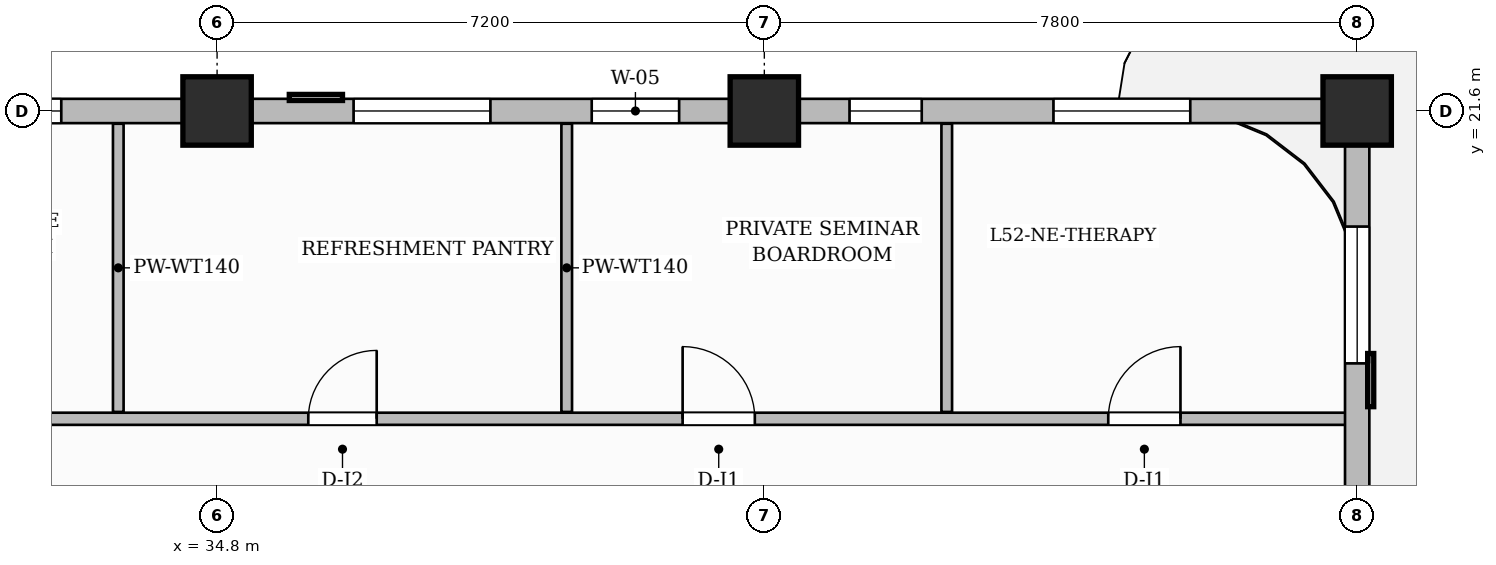
"""IFC4 building model, lengths in metres.
Left out: names, types, materials, properties, quantities, classifications, styles, units other than length and angle.
Written with IfcOpenShell. Run it as: python <this file> out.ifc"""

import sys

from ifc_helpers import new_model, si_unit, direction, frame, frame_2d, origin, origin_2d, place, context, subcontext, project, spatial, rectangle, extrude, source, transform, mapped, element, fill, save


model = new_model("IFC4")
c1 = context("Model", 3, precision=1e-05, world=origin(), true_north=direction((0.0, 1.0)))
c2 = subcontext(c1, "Body", "Model", "MODEL_VIEW")
j1 = project(units=[si_unit("LENGTHUNIT", "METRE"), si_unit("PLANEANGLEUNIT", "RADIAN")], contexts=[c1])
p1 = place(None, origin())
s1 = spatial("IfcSite", under=j1, at=p1, CompositionType="ELEMENT")
p2 = place(p1, origin())
s2 = spatial("IfcBuilding", under=s1, at=p2, CompositionType="ELEMENT")
p3 = place(p2, frame((0.0, 0.0, 209.6)))
s3 = spatial("IfcBuildingStorey", under=s2, at=p3, CompositionType="ELEMENT", Elevation=209.6)
m1 = source(origin(), c2, "Body", "SweptSolid", [
    extrude(rectangle(XDim=0.9, YDim=0.9, at=origin_2d()), origin(), (0.0, 0.0, 1.0), 3.85),
])
for number, where, z_axis, x_axis in (
    (1, (34.8, 21.6, 0.0), (0.0, 0.0, 1.0), (1.0, 0.0, 0.0)),
    (2, (42.0, 21.6, 0.0), (0.0, 0.0, 1.0), (1.0, 0.0, 0.0)),
    (3, (49.8, 21.6, 0.0), (0.0, 0.0, 1.0), (1.0, 0.0, 0.0)),
):
    element("IfcColumn", number, at=place(p3, frame(where, z_axis=z_axis, x_axis=x_axis)), inside=s3, PredefinedType="COLUMN", context=c2, shape_type="MappedRepresentation", body=[
        mapped(m1, transform((0.0, 0.0, 0.0), scale=1.0)),
    ])
p4 = place(p3, frame((30.29, 17.55, 0.0), z_axis=(0.0, 0.0, 1.0), x_axis=(1.0, 0.0, 0.0)))
e4 = element("IfcWall", 4, at=p4, inside=s3, PredefinedType="PARTITIONING", context=c2, shape_type="SweptSolid", body=[
    extrude(rectangle(XDim=19.37, YDim=0.16, at=frame_2d((9.685, 0.0))), origin(), (0.0, 0.0, 1.0), 3.6),
])
p5 = place(p4, frame((1.135, 0.0, 0.0)))
e5 = element("IfcOpeningElement", 5, at=p5, cuts=e4, PredefinedType="OPENING", context=c2, shape_type="SweptSolid", body=[
    extrude(rectangle(XDim=0.85, YDim=2.1, at=frame_2d((0.425, 1.05))), frame((0.0, 0.09, 0.0), z_axis=(0.0, -1.0, 0.0), x_axis=(1.0, 0.0, 0.0)), (0.0, 0.0, 1.0), 0.18),
])
p6 = place(p4, frame((5.71, 0.0, 0.0)))
e6 = element("IfcOpeningElement", 6, at=p6, cuts=e4, PredefinedType="OPENING", context=c2, shape_type="SweptSolid", body=[
    extrude(rectangle(XDim=0.9, YDim=2.15, at=frame_2d((0.45, 1.075))), frame((0.0, 0.09, 0.0), z_axis=(0.0, -1.0, 0.0), x_axis=(1.0, 0.0, 0.0)), (0.0, 0.0, 1.0), 0.18),
])
p7 = place(p4, frame((10.635, 0.0, 0.0)))
e7 = element("IfcOpeningElement", 7, at=p7, cuts=e4, PredefinedType="OPENING", context=c2, shape_type="SweptSolid", body=[
    extrude(rectangle(XDim=0.95, YDim=2.15, at=frame_2d((0.475, 1.075))), frame((0.0, 0.09, 0.0), z_axis=(0.0, -1.0, 0.0), x_axis=(1.0, 0.0, 0.0)), (0.0, 0.0, 1.0), 0.18),
])
p8 = place(p4, frame((16.235, 0.0, 0.0)))
e8 = element("IfcOpeningElement", 8, at=p8, cuts=e4, PredefinedType="OPENING", context=c2, shape_type="SweptSolid", body=[
    extrude(rectangle(XDim=0.95, YDim=2.15, at=frame_2d((0.475, 1.075))), frame((0.0, 0.09, 0.0), z_axis=(0.0, -1.0, 0.0), x_axis=(1.0, 0.0, 0.0)), (0.0, 0.0, 1.0), 0.18),
])
for number, where, z_axis, x_axis in (
    (9, (33.5, 17.64, 0.0), (0.0, 0.0, 1.0), (0.0, 1.0, 0.0)),
    (10, (39.4, 17.64, 0.0), (0.0, 0.0, 1.0), (0.0, 1.0, 0.0)),
    (11, (44.4, 17.64, 0.0), (0.0, 0.0, 1.0), (0.0, 1.0, 0.0)),
):
    element("IfcWall", number, at=place(p3, frame(where, z_axis=z_axis, x_axis=x_axis)), inside=s3, PredefinedType="PARTITIONING", context=c2, shape_type="SweptSolid", body=[
        extrude(rectangle(XDim=3.792, YDim=0.14, at=frame_2d((1.896, 0.0))), origin(), (0.0, 0.0, 1.0), 3.6),
    ])
p9 = place(p3, frame((49.8, 14.62, 0.0), z_axis=(0.0, 0.0, 1.0), x_axis=(0.0, 1.0, 0.0)))
e12 = element("IfcWall", 12, at=p9, inside=s3, PredefinedType="SOLIDWALL", context=c2, shape_type="SweptSolid", body=[
    extrude(rectangle(XDim=6.93, YDim=0.32, at=frame_2d((3.465, 0.0))), origin(), (0.0, 0.0, 1.0), 3.085),
])
p10 = place(p9, frame((0.42, 0.0, 0.0)))
e13 = element("IfcOpeningElement", 13, at=p10, cuts=e12, PredefinedType="OPENING", context=c2, shape_type="SweptSolid", body=[
    extrude(rectangle(XDim=1.2, YDim=2.2, at=frame_2d((0.6, 1.1))), frame((0.0, 0.17, 0.0), z_axis=(0.0, -1.0, 0.0), x_axis=(1.0, 0.0, 0.0)), (0.0, 0.0, 1.0), 0.34),
])
p11 = place(p9, frame((3.659, 0.0, 0.8)))
e14 = element("IfcOpeningElement", 14, at=p11, cuts=e12, PredefinedType="OPENING", context=c2, shape_type="SweptSolid", body=[
    extrude(rectangle(XDim=1.8, YDim=1.85, at=frame_2d((0.9, 0.925))), frame((0.0, 0.17, 0.0), z_axis=(0.0, -1.0, 0.0), x_axis=(1.0, 0.0, 0.0)), (0.0, 0.0, 1.0), 0.34),
])
p12 = place(p3, frame((18.0, 21.6, 0.0), z_axis=(0.0, 0.0, 1.0), x_axis=(1.0, 0.0, 0.0)))
e15 = element("IfcWall", 15, at=p12, inside=s3, PredefinedType="SOLIDWALL", context=c2, shape_type="SweptSolid", body=[
    extrude(rectangle(XDim=31.8, YDim=0.32, at=frame_2d((15.9, 0.0))), origin(), (0.0, 0.0, 1.0), 3.085),
])
p13 = place(p12, frame((0.885, 0.0, 0.8)))
e16 = element("IfcOpeningElement", 16, at=p13, cuts=e15, PredefinedType="OPENING", context=c2, shape_type="SweptSolid", body=[
    extrude(rectangle(XDim=1.4, YDim=1.85, at=frame_2d((0.7, 0.925))), frame((0.0, 0.17, 0.0), z_axis=(0.0, -1.0, 0.0), x_axis=(1.0, 0.0, 0.0)), (0.0, 0.0, 1.0), 0.34),
])
p14 = place(p12, frame((4.581, 0.0, 0.8)))
e17 = element("IfcOpeningElement", 17, at=p14, cuts=e15, PredefinedType="OPENING", context=c2, shape_type="SweptSolid", body=[
    extrude(rectangle(XDim=0.95, YDim=1.75, at=frame_2d((0.475, 0.875))), frame((0.0, 0.17, 0.0), z_axis=(0.0, -1.0, 0.0), x_axis=(1.0, 0.0, 0.0)), (0.0, 0.0, 1.0), 0.34),
])
p15 = place(p12, frame((6.21, 0.0, 0.8)))
e18 = element("IfcOpeningElement", 18, at=p15, cuts=e15, PredefinedType="OPENING", context=c2, shape_type="SweptSolid", body=[
    extrude(rectangle(XDim=1.4, YDim=1.85, at=frame_2d((0.7, 0.925))), frame((0.0, 0.17, 0.0), z_axis=(0.0, -1.0, 0.0), x_axis=(1.0, 0.0, 0.0)), (0.0, 0.0, 1.0), 0.34),
])
p16 = place(p12, frame((8.48, 0.0, 0.8)))
e19 = element("IfcOpeningElement", 19, at=p16, cuts=e15, PredefinedType="OPENING", context=c2, shape_type="SweptSolid", body=[
    extrude(rectangle(XDim=1.15, YDim=1.8, at=frame_2d((0.575, 0.9))), frame((0.0, 0.17, 0.0), z_axis=(0.0, -1.0, 0.0), x_axis=(1.0, 0.0, 0.0)), (0.0, 0.0, 1.0), 0.34),
])
p17 = place(p12, frame((12.95, 0.0, 0.8)))
e20 = element("IfcOpeningElement", 20, at=p17, cuts=e15, PredefinedType="OPENING", context=c2, shape_type="SweptSolid", body=[
    extrude(rectangle(XDim=1.8, YDim=1.85, at=frame_2d((0.9, 0.925))), frame((0.0, 0.17, 0.0), z_axis=(0.0, -1.0, 0.0), x_axis=(1.0, 0.0, 0.0)), (0.0, 0.0, 1.0), 0.34),
])
p18 = place(p12, frame((18.596, 0.0, 0.8)))
e21 = element("IfcOpeningElement", 21, at=p18, cuts=e15, PredefinedType="OPENING", context=c2, shape_type="SweptSolid", body=[
    extrude(rectangle(XDim=1.8, YDim=1.85, at=frame_2d((0.9, 0.925))), frame((0.0, 0.17, 0.0), z_axis=(0.0, -1.0, 0.0), x_axis=(1.0, 0.0, 0.0)), (0.0, 0.0, 1.0), 0.34),
])
p19 = place(p12, frame((21.729, 0.0, 0.8)))
e22 = element("IfcOpeningElement", 22, at=p19, cuts=e15, PredefinedType="OPENING", context=c2, shape_type="SweptSolid", body=[
    extrude(rectangle(XDim=1.15, YDim=1.8, at=frame_2d((0.575, 0.9))), frame((0.0, 0.17, 0.0), z_axis=(0.0, -1.0, 0.0), x_axis=(1.0, 0.0, 0.0)), (0.0, 0.0, 1.0), 0.34),
])
p20 = place(p12, frame((25.121, 0.0, 0.8)))
e23 = element("IfcOpeningElement", 23, at=p20, cuts=e15, PredefinedType="OPENING", context=c2, shape_type="SweptSolid", body=[
    extrude(rectangle(XDim=0.95, YDim=1.75, at=frame_2d((0.475, 0.875))), frame((0.0, 0.17, 0.0), z_axis=(0.0, -1.0, 0.0), x_axis=(1.0, 0.0, 0.0)), (0.0, 0.0, 1.0), 0.34),
])
p21 = place(p12, frame((27.804, 0.0, 0.8)))
e24 = element("IfcOpeningElement", 24, at=p21, cuts=e15, PredefinedType="OPENING", context=c2, shape_type="SweptSolid", body=[
    extrude(rectangle(XDim=1.8, YDim=1.85, at=frame_2d((0.9, 0.925))), frame((0.0, 0.17, 0.0), z_axis=(0.0, -1.0, 0.0), x_axis=(1.0, 0.0, 0.0)), (0.0, 0.0, 1.0), 0.34),
])
m2 = source(origin(), c2, "Body", "SweptSolid", [
    extrude(rectangle(XDim=0.9, YDim=2.15, at=frame_2d((0.45, 1.075))), frame((0.0, 0.025, 0.0), z_axis=(0.0, -1.0, 0.0), x_axis=(1.0, 0.0, 0.0)), (0.0, 0.0, 1.0), 0.05),
])
p22 = place(p6, origin())
e25 = element("IfcDoor", 25, at=p22, inside=s3, OperationType="SINGLE_SWING_RIGHT", PredefinedType="DOOR", context=c2, shape_type="MappedRepresentation", body=[
    mapped(m2, transform((0.0, 0.0, 0.0), scale=1.0)),
])
fill(e6, e25)
m3 = source(origin(), c2, "Body", "SweptSolid", [
    extrude(rectangle(XDim=0.95, YDim=2.15, at=frame_2d((0.475, 1.075))), frame((0.0, 0.025, 0.0), z_axis=(0.0, -1.0, 0.0), x_axis=(1.0, 0.0, 0.0)), (0.0, 0.0, 1.0), 0.05),
])
p23 = place(p7, origin())
e26 = element("IfcDoor", 26, at=p23, inside=s3, OperationType="SINGLE_SWING_LEFT", PredefinedType="DOOR", context=c2, shape_type="MappedRepresentation", body=[
    mapped(m3, transform((0.0, 0.0, 0.0), scale=1.0)),
])
fill(e7, e26)
p24 = place(p8, origin())
e27 = element("IfcDoor", 27, at=p24, inside=s3, OperationType="SINGLE_SWING_RIGHT", PredefinedType="DOOR", context=c2, shape_type="MappedRepresentation", body=[
    mapped(m3, transform((0.0, 0.0, 0.0), scale=1.0)),
])
fill(e8, e27)
m4 = source(origin(), c2, "Body", "SweptSolid", [
    extrude(rectangle(XDim=1.8, YDim=1.85, at=frame_2d((0.9, 0.925))), frame((0.0, 0.03, 0.0), z_axis=(0.0, -1.0, 0.0), x_axis=(1.0, 0.0, 0.0)), (0.0, 0.0, 1.0), 0.06),
])
p25 = place(p11, origin())
e28 = element("IfcWindow", 28, at=p25, inside=s3, PartitioningType="DOUBLE_PANEL_VERTICAL", PredefinedType="WINDOW", context=c2, shape_type="MappedRepresentation", body=[
    mapped(m4, transform((0.0, 0.0, 0.0), scale=1.0)),
])
fill(e14, e28)
p26 = place(p17, origin())
e29 = element("IfcWindow", 29, at=p26, inside=s3, PartitioningType="DOUBLE_PANEL_VERTICAL", PredefinedType="WINDOW", context=c2, shape_type="MappedRepresentation", body=[
    mapped(m4, transform((0.0, 0.0, 0.0), scale=1.0)),
])
fill(e20, e29)
p27 = place(p18, origin())
e30 = element("IfcWindow", 30, at=p27, inside=s3, PartitioningType="DOUBLE_PANEL_VERTICAL", PredefinedType="WINDOW", context=c2, shape_type="MappedRepresentation", body=[
    mapped(m4, transform((0.0, 0.0, 0.0), scale=1.0)),
])
fill(e21, e30)
m5 = source(origin(), c2, "Body", "SweptSolid", [
    extrude(rectangle(XDim=1.15, YDim=1.8, at=frame_2d((0.575, 0.9))), frame((0.0, 0.03, 0.0), z_axis=(0.0, -1.0, 0.0), x_axis=(1.0, 0.0, 0.0)), (0.0, 0.0, 1.0), 0.06),
])
p28 = place(p19, origin())
e31 = element("IfcWindow", 31, at=p28, inside=s3, PartitioningType="SINGLE_PANEL", PredefinedType="WINDOW", context=c2, shape_type="MappedRepresentation", body=[
    mapped(m5, transform((0.0, 0.0, 0.0), scale=1.0)),
])
fill(e22, e31)
m6 = source(origin(), c2, "Body", "SweptSolid", [
    extrude(rectangle(XDim=0.95, YDim=1.75, at=frame_2d((0.475, 0.875))), frame((0.0, 0.03, 0.0), z_axis=(0.0, -1.0, 0.0), x_axis=(1.0, 0.0, 0.0)), (0.0, 0.0, 1.0), 0.06),
])
p29 = place(p20, origin())
e32 = element("IfcWindow", 32, at=p29, inside=s3, PartitioningType="SINGLE_PANEL", PredefinedType="WINDOW", context=c2, shape_type="MappedRepresentation", body=[
    mapped(m6, transform((0.0, 0.0, 0.0), scale=1.0)),
])
fill(e23, e32)
p30 = place(p21, origin())
e33 = element("IfcWindow", 33, at=p30, inside=s3, PartitioningType="DOUBLE_PANEL_VERTICAL", PredefinedType="WINDOW", context=c2, shape_type="MappedRepresentation", body=[
    mapped(m4, transform((0.0, 0.0, 0.0), scale=1.0)),
])
fill(e24, e33)
save(model, sys.argv[1])
